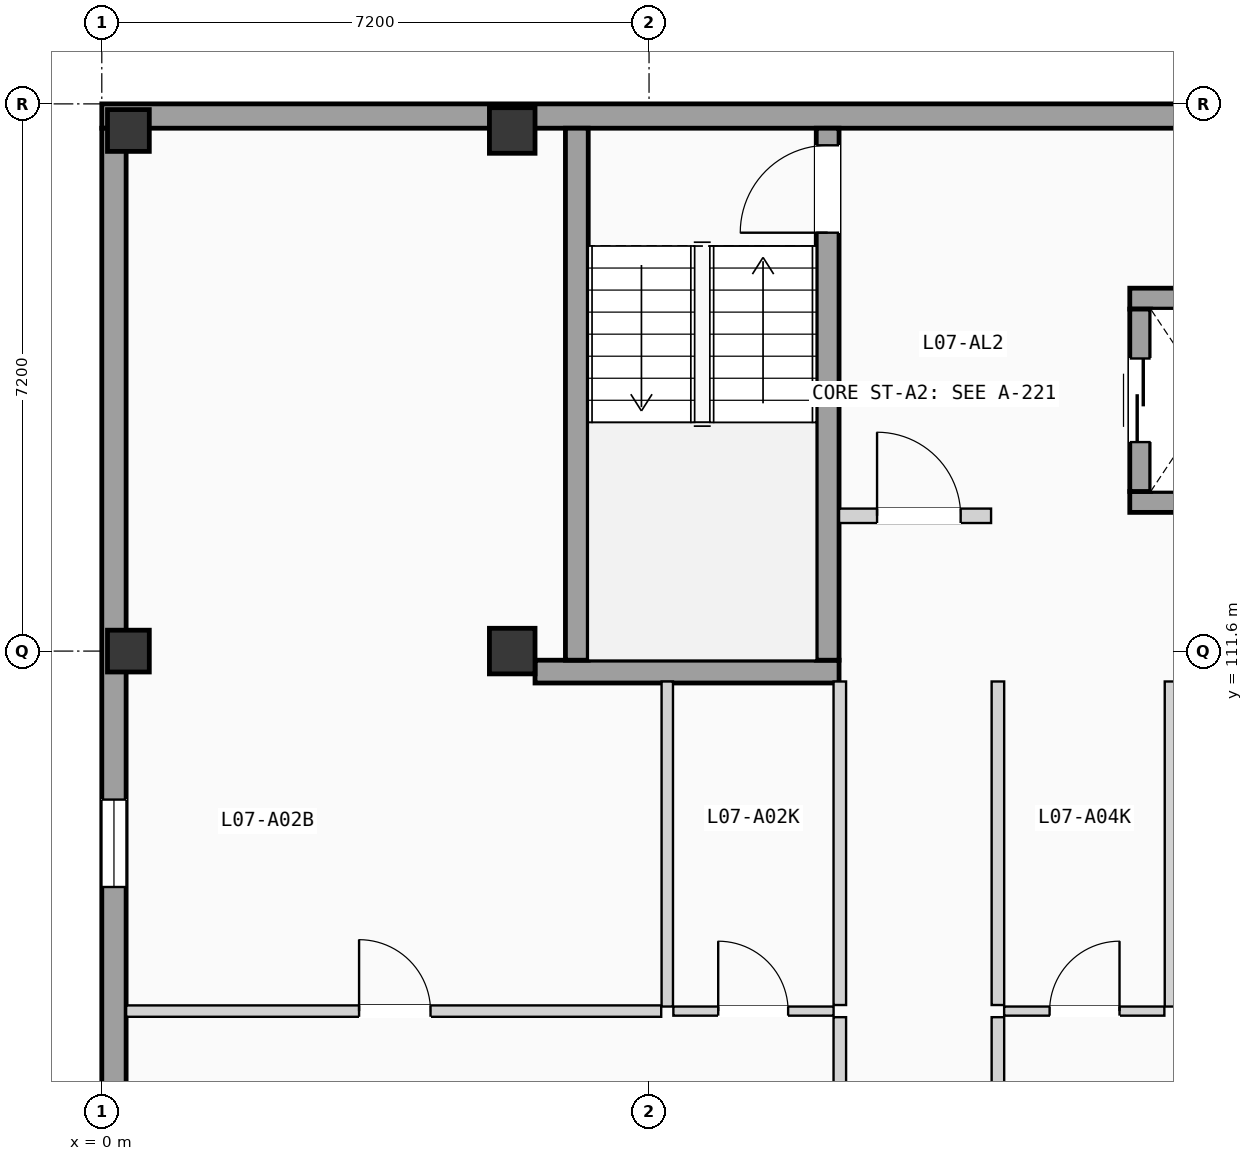
"""IFC4 building model, lengths in metres.
Left out: names, types, materials, properties, quantities, classifications, styles, units other than length and angle.
Written with IfcOpenShell. Run it as: python <this file> out.ifc"""

import sys

from ifc_helpers import new_model, si_unit, direction, frame, frame_2d, origin, origin_2d, place, context, subcontext, project, spatial, rectangle, extrude, element, fill, save


model = new_model("IFC4")
c1 = context("Model", 3, precision=1e-05, world=origin(), true_north=direction((0.0, 1.0)))
c2 = subcontext(c1, "Body", "Model", "MODEL_VIEW")
j1 = project(units=[si_unit("LENGTHUNIT", "METRE"), si_unit("PLANEANGLEUNIT", "RADIAN")], contexts=[c1])
p1 = place(None, origin())
s1 = spatial("IfcSite", under=j1, at=p1, CompositionType="ELEMENT")
p2 = place(p1, origin())
s2 = spatial("IfcBuilding", under=s1, at=p2, CompositionType="ELEMENT")
p3 = place(p2, frame((0.0, 0.0, 24.675)))
s3 = spatial("IfcBuildingStorey", under=s2, at=p3, CompositionType="ELEMENT", Elevation=24.675)
for number, where, z_axis, x_axis in (
    (1, (0.35, 111.6, 0.0), (0.0, 0.0, 1.0), (1.0, 0.0, 0.0)),
    (2, (0.35, 118.45, 0.0), (0.0, 0.0, 1.0), (1.0, 0.0, 0.0)),
):
    element("IfcColumn", number, at=place(p3, frame(where, z_axis=z_axis, x_axis=x_axis)), inside=s3, PredefinedType="COLUMN", context=c2, shape_type="SweptSolid", body=[
        extrude(rectangle(XDim=0.55, YDim=0.55, at=origin_2d()), origin(), (0.0, 0.0, 1.0), 3.15),
    ])
for number, where, z_axis, x_axis in (
    (3, (5.4, 111.6, 0.0), (0.0, 0.0, 1.0), (1.0, 0.0, 0.0)),
    (4, (5.4, 118.45, 0.0), (0.0, 0.0, 1.0), (1.0, 0.0, 0.0)),
):
    element("IfcColumn", number, at=place(p3, frame(where, z_axis=z_axis, x_axis=x_axis)), inside=s3, PredefinedType="COLUMN", context=c2, shape_type="SweptSolid", body=[
        extrude(rectangle(XDim=0.6, YDim=0.6, at=origin_2d()), origin(), (0.0, 0.0, 1.0), 3.15),
    ])
p4 = place(p3, frame((0.0, 118.64, 0.0), z_axis=(0.0, 0.0, 1.0), x_axis=(1.0, 0.0, 0.0)))
e5 = element("IfcWall", 5, at=p4, inside=s3, PredefinedType="SOLIDWALL", context=c2, shape_type="SweptSolid", body=[
    extrude(rectangle(XDim=21.6, YDim=0.32, at=frame_2d((10.8, 0.0))), origin(), (0.0, 0.0, 1.0), 2.9),
])
p5 = place(p3, frame((0.16, 68.72, 0.0), z_axis=(0.0, 0.0, 1.0), x_axis=(0.0, 1.0, 0.0)))
e6 = element("IfcWall", 6, at=p5, inside=s3, PredefinedType="SOLIDWALL", context=c2, shape_type="SweptSolid", body=[
    extrude(rectangle(XDim=49.76, YDim=0.32, at=frame_2d((24.88, 0.0))), origin(), (0.0, 0.0, 1.0), 2.9),
])
p6 = place(p5, frame((17.155, 0.0, 0.715)))
e7 = element("IfcOpeningElement", 7, at=p6, cuts=e6, PredefinedType="OPENING", context=c2, shape_type="SweptSolid", body=[
    extrude(rectangle(XDim=1.05, YDim=1.5, at=frame_2d((0.525, 0.75))), frame((0.0, 0.17, 0.0), z_axis=(0.0, -1.0, 0.0), x_axis=(1.0, 0.0, 0.0)), (0.0, 0.0, 1.0), 0.34),
])
p7 = place(p5, frame((10.02, 0.0, 0.565)))
e8 = element("IfcOpeningElement", 8, at=p7, cuts=e6, PredefinedType="OPENING", context=c2, shape_type="SweptSolid", body=[
    extrude(rectangle(XDim=1.05, YDim=1.65, at=frame_2d((0.525, 0.825))), frame((0.0, 0.17, 0.0), z_axis=(0.0, -1.0, 0.0), x_axis=(1.0, 0.0, 0.0)), (0.0, 0.0, 1.0), 0.34),
])
p8 = place(p5, frame((24.405, 0.0, 0.85)))
e9 = element("IfcOpeningElement", 9, at=p8, cuts=e6, PredefinedType="OPENING", context=c2, shape_type="SweptSolid", body=[
    extrude(rectangle(XDim=0.95, YDim=1.2, at=frame_2d((0.475, 0.6))), frame((0.0, 0.17, 0.0), z_axis=(0.0, -1.0, 0.0), x_axis=(1.0, 0.0, 0.0)), (0.0, 0.0, 1.0), 0.34),
])
p9 = place(p5, frame((33.584, 0.0, 0.9)))
e10 = element("IfcOpeningElement", 10, at=p9, cuts=e6, PredefinedType="OPENING", context=c2, shape_type="SweptSolid", body=[
    extrude(rectangle(XDim=1.15, YDim=1.2, at=frame_2d((0.575, 0.6))), frame((0.0, 0.17, 0.0), z_axis=(0.0, -1.0, 0.0), x_axis=(1.0, 0.0, 0.0)), (0.0, 0.0, 1.0), 0.34),
])
p10 = place(p5, frame((30.174, 0.0, 0.865)))
e11 = element("IfcOpeningElement", 11, at=p10, cuts=e6, PredefinedType="OPENING", context=c2, shape_type="SweptSolid", body=[
    extrude(rectangle(XDim=1.15, YDim=1.35, at=frame_2d((0.575, 0.675))), frame((0.0, 0.17, 0.0), z_axis=(0.0, -1.0, 0.0), x_axis=(1.0, 0.0, 0.0)), (0.0, 0.0, 1.0), 0.34),
])
p11 = place(p5, frame((39.776, 0.0, 0.715)))
e12 = element("IfcOpeningElement", 12, at=p11, cuts=e6, PredefinedType="OPENING", context=c2, shape_type="SweptSolid", body=[
    extrude(rectangle(XDim=1.15, YDim=1.5, at=frame_2d((0.575, 0.75))), frame((0.0, 0.17, 0.0), z_axis=(0.0, -1.0, 0.0), x_axis=(1.0, 0.0, 0.0)), (0.0, 0.0, 1.0), 0.34),
])
p12 = place(p3, frame((5.7, 111.33, 0.0), z_axis=(0.0, 0.0, 1.0), x_axis=(1.0, 0.0, 0.0)))
e13 = element("IfcWall", 13, at=p12, inside=s3, PredefinedType="SHEAR", context=c2, shape_type="SweptSolid", body=[
    extrude(rectangle(XDim=4.0, YDim=0.3, at=frame_2d((2.0, 0.0))), origin(), (0.0, 0.0, 1.0), 2.9),
])
p13 = place(p3, frame((6.25, 111.48, 0.0), z_axis=(0.0, 0.0, 1.0), x_axis=(0.0, 1.0, 0.0)))
e14 = element("IfcWall", 14, at=p13, inside=s3, PredefinedType="SHEAR", context=c2, shape_type="SweptSolid", body=[
    extrude(rectangle(XDim=7.0, YDim=0.3, at=frame_2d((3.5, 0.0))), origin(), (0.0, 0.0, 1.0), 2.9),
])
p14 = place(p3, frame((9.55, 111.48, 0.0), z_axis=(0.0, 0.0, 1.0), x_axis=(0.0, 1.0, 0.0)))
e15 = element("IfcWall", 15, at=p14, inside=s3, PredefinedType="SHEAR", context=c2, shape_type="SweptSolid", body=[
    extrude(rectangle(XDim=7.0, YDim=0.3, at=frame_2d((3.5, 0.0))), origin(), (0.0, 0.0, 1.0), 2.9),
])
p15 = place(p14, frame((5.625, 0.0, 0.0)))
e16 = element("IfcOpeningElement", 16, at=p15, cuts=e15, PredefinedType="OPENING", context=c2, shape_type="SweptSolid", body=[
    extrude(rectangle(XDim=1.15, YDim=2.12, at=frame_2d((0.575, 1.06))), frame((0.0, 0.16, 0.0), z_axis=(0.0, -1.0, 0.0), x_axis=(1.0, 0.0, 0.0)), (0.0, 0.0, 1.0), 0.32),
])
for number, where, z_axis, x_axis in (
    (17, (13.525, 113.562, 0.0), (0.0, 0.0, 1.0), (1.0, 0.0, 0.0)),
    (18, (13.525, 116.238, 0.0), (0.0, 0.0, 1.0), (1.0, 0.0, 0.0)),
):
    element("IfcWall", number, at=place(p3, frame(where, z_axis=z_axis, x_axis=x_axis)), inside=s3, PredefinedType="SHEAR", context=c2, shape_type="SweptSolid", body=[
        extrude(rectangle(XDim=2.15, YDim=0.275, at=frame_2d((1.075, 0.0))), origin(), (0.0, 0.0, 1.0), 2.9),
    ])
p16 = place(p3, frame((13.663, 113.7, 0.0), z_axis=(0.0, 0.0, 1.0), x_axis=(0.0, 1.0, 0.0)))
e19 = element("IfcWall", 19, at=p16, inside=s3, PredefinedType="SHEAR", context=c2, shape_type="SweptSolid", body=[
    extrude(rectangle(XDim=2.4, YDim=0.275, at=frame_2d((1.2, 0.0))), origin(), (0.0, 0.0, 1.0), 2.9),
])
p17 = place(p16, frame((0.65, 0.0, 0.0)))
e20 = element("IfcOpeningElement", 20, at=p17, cuts=e19, PredefinedType="OPENING", context=c2, shape_type="SweptSolid", body=[
    extrude(rectangle(XDim=1.1, YDim=2.15, at=frame_2d((0.55, 1.075))), frame((0.0, 0.147, 0.0), z_axis=(0.0, -1.0, 0.0), x_axis=(1.0, 0.0, 0.0)), (0.0, 0.0, 1.0), 0.295),
])
p18 = place(p3, frame((9.7, 113.38, 0.0), z_axis=(0.0, 0.0, 1.0), x_axis=(1.0, 0.0, 0.0)))
e21 = element("IfcWall", 21, at=p18, inside=s3, PredefinedType="PARTITIONING", context=c2, shape_type="SweptSolid", body=[
    extrude(rectangle(XDim=2.0, YDim=0.19, at=frame_2d((1.0, 0.0))), origin(), (0.0, 0.0, 1.0), 2.87),
])
p19 = place(p18, frame((0.5, 0.0, 0.0)))
e22 = element("IfcOpeningElement", 22, at=p19, cuts=e21, PredefinedType="OPENING", context=c2, shape_type="SweptSolid", body=[
    extrude(rectangle(XDim=1.1, YDim=2.12, at=frame_2d((0.55, 1.06))), frame((0.0, 0.105, 0.0), z_axis=(0.0, -1.0, 0.0), x_axis=(1.0, 0.0, 0.0)), (0.0, 0.0, 1.0), 0.21),
])
p20 = place(p3, frame((9.71, 101.627, 0.0), z_axis=(0.0, 0.0, 1.0), x_axis=(0.0, 1.0, 0.0)))
e23 = element("IfcWall", 23, at=p20, inside=s3, PredefinedType="PARTITIONING", context=c2, shape_type="SweptSolid", body=[
    extrude(rectangle(XDim=5.156, YDim=0.165, at=frame_2d((2.578, 0.0))), origin(), (0.0, 0.0, 1.0), 2.87),
])
p21 = place(p20, frame((2.088, 0.0, 0.0)))
e24 = element("IfcOpeningElement", 24, at=p21, cuts=e23, PredefinedType="OPENING", context=c2, shape_type="SweptSolid", body=[
    extrude(rectangle(XDim=0.98, YDim=2.08, at=frame_2d((0.49, 1.04))), frame((0.0, 0.093, 0.0), z_axis=(0.0, -1.0, 0.0), x_axis=(1.0, 0.0, 0.0)), (0.0, 0.0, 1.0), 0.185),
])
p22 = place(p3, frame((9.71, 106.943, 0.0), z_axis=(0.0, 0.0, 1.0), x_axis=(0.0, 1.0, 0.0)))
e25 = element("IfcWall", 25, at=p22, inside=s3, PredefinedType="PARTITIONING", context=c2, shape_type="SweptSolid", body=[
    extrude(rectangle(XDim=4.257, YDim=0.165, at=frame_2d((2.128, 0.0))), origin(), (0.0, 0.0, 1.0), 2.87),
])
p23 = place(p3, frame((11.79, 101.627, 0.0), z_axis=(0.0, 0.0, 1.0), x_axis=(0.0, 1.0, 0.0)))
e26 = element("IfcWall", 26, at=p23, inside=s3, PredefinedType="PARTITIONING", context=c2, shape_type="SweptSolid", body=[
    extrude(rectangle(XDim=5.156, YDim=0.165, at=frame_2d((2.578, 0.0))), origin(), (0.0, 0.0, 1.0), 2.87),
])
p24 = place(p23, frame((2.088, 0.0, 0.0)))
e27 = element("IfcOpeningElement", 27, at=p24, cuts=e26, PredefinedType="OPENING", context=c2, shape_type="SweptSolid", body=[
    extrude(rectangle(XDim=0.98, YDim=2.08, at=frame_2d((0.49, 1.04))), frame((0.0, 0.093, 0.0), z_axis=(0.0, -1.0, 0.0), x_axis=(1.0, 0.0, 0.0)), (0.0, 0.0, 1.0), 0.185),
])
p25 = place(p3, frame((11.79, 106.943, 0.0), z_axis=(0.0, 0.0, 1.0), x_axis=(0.0, 1.0, 0.0)))
e28 = element("IfcWall", 28, at=p25, inside=s3, PredefinedType="PARTITIONING", context=c2, shape_type="SweptSolid", body=[
    extrude(rectangle(XDim=4.257, YDim=0.165, at=frame_2d((2.128, 0.0))), origin(), (0.0, 0.0, 1.0), 2.87),
])
p26 = place(p3, frame((7.52, 106.863, 0.0), z_axis=(0.0, 0.0, 1.0), x_axis=(1.0, 0.0, 0.0)))
e29 = element("IfcWall", 29, at=p26, inside=s3, PredefinedType="PARTITIONING", context=c2, shape_type="SweptSolid", body=[
    extrude(rectangle(XDim=2.108, YDim=0.12, at=frame_2d((1.054, 0.0))), origin(), (0.0, 0.0, 1.0), 2.87),
])
p27 = place(p26, frame((0.59, 0.0, 0.0)))
e30 = element("IfcOpeningElement", 30, at=p27, cuts=e29, PredefinedType="OPENING", context=c2, shape_type="SweptSolid", body=[
    extrude(rectangle(XDim=0.92, YDim=2.02, at=frame_2d((0.46, 1.01))), frame((0.0, 0.07, 0.0), z_axis=(0.0, -1.0, 0.0), x_axis=(1.0, 0.0, 0.0)), (0.0, 0.0, 1.0), 0.14),
])
p28 = place(p3, frame((0.32, 106.863, 0.0), z_axis=(0.0, 0.0, 1.0), x_axis=(1.0, 0.0, 0.0)))
e31 = element("IfcWall", 31, at=p28, inside=s3, PredefinedType="PARTITIONING", context=c2, shape_type="SweptSolid", body=[
    extrude(rectangle(XDim=7.04, YDim=0.15, at=frame_2d((3.52, 0.0))), origin(), (0.0, 0.0, 1.0), 2.87),
])
p29 = place(p28, frame((3.065, 0.0, 0.0)))
e32 = element("IfcOpeningElement", 32, at=p29, cuts=e31, PredefinedType="OPENING", context=c2, shape_type="SweptSolid", body=[
    extrude(rectangle(XDim=0.94, YDim=2.06, at=frame_2d((0.47, 1.03))), frame((0.0, 0.085, 0.0), z_axis=(0.0, -1.0, 0.0), x_axis=(1.0, 0.0, 0.0)), (0.0, 0.0, 1.0), 0.17),
])
p30 = place(p3, frame((7.44, 106.923, 0.0), z_axis=(0.0, 0.0, 1.0), x_axis=(0.0, 1.0, 0.0)))
e33 = element("IfcWall", 33, at=p30, inside=s3, PredefinedType="PARTITIONING", context=c2, shape_type="SweptSolid", body=[
    extrude(rectangle(XDim=4.277, YDim=0.15, at=frame_2d((2.138, 0.0))), origin(), (0.0, 0.0, 1.0), 2.87),
])
p31 = place(p3, frame((11.872, 106.863, 0.0), z_axis=(0.0, 0.0, 1.0), x_axis=(1.0, 0.0, 0.0)))
e34 = element("IfcWall", 34, at=p31, inside=s3, PredefinedType="PARTITIONING", context=c2, shape_type="SweptSolid", body=[
    extrude(rectangle(XDim=2.108, YDim=0.12, at=frame_2d((1.054, 0.0))), origin(), (0.0, 0.0, 1.0), 2.87),
])
p32 = place(p31, frame((0.598, 0.0, 0.0)))
e35 = element("IfcOpeningElement", 35, at=p32, cuts=e34, PredefinedType="OPENING", context=c2, shape_type="SweptSolid", body=[
    extrude(rectangle(XDim=0.92, YDim=2.02, at=frame_2d((0.46, 1.01))), frame((0.0, 0.07, 0.0), z_axis=(0.0, -1.0, 0.0), x_axis=(1.0, 0.0, 0.0)), (0.0, 0.0, 1.0), 0.14),
])
p33 = place(p3, frame((14.06, 106.923, 0.0), z_axis=(0.0, 0.0, 1.0), x_axis=(0.0, 1.0, 0.0)))
e36 = element("IfcWall", 36, at=p33, inside=s3, PredefinedType="PARTITIONING", context=c2, shape_type="SweptSolid", body=[
    extrude(rectangle(XDim=4.277, YDim=0.15, at=frame_2d((2.138, 0.0))), origin(), (0.0, 0.0, 1.0), 2.87),
])
p34 = place(p11, origin())
e37 = element("IfcWindow", 37, at=p34, inside=s3, PartitioningType="SINGLE_PANEL", PredefinedType="WINDOW", context=c2, shape_type="SweptSolid", body=[
    extrude(rectangle(XDim=1.15, YDim=1.5, at=frame_2d((0.575, 0.75))), frame((0.0, 0.03, 0.0), z_axis=(0.0, -1.0, 0.0), x_axis=(1.0, 0.0, 0.0)), (0.0, 0.0, 1.0), 0.06),
])
fill(e12, e37)
p35 = place(p15, origin())
e38 = element("IfcDoor", 38, at=p35, inside=s3, OperationType="SINGLE_SWING_LEFT", PredefinedType="DOOR", context=c2, shape_type="SweptSolid", body=[
    extrude(rectangle(XDim=1.15, YDim=2.12, at=frame_2d((0.575, 1.06))), frame((0.0, 0.025, 0.0), z_axis=(0.0, -1.0, 0.0), x_axis=(1.0, 0.0, 0.0)), (0.0, 0.0, 1.0), 0.05),
])
fill(e16, e38)
p36 = place(p17, origin())
e39 = element("IfcDoor", 39, at=p36, inside=s3, OperationType="SLIDING_TO_LEFT", PredefinedType="DOOR", context=c2, shape_type="SweptSolid", body=[
    extrude(rectangle(XDim=1.1, YDim=2.15, at=frame_2d((0.55, 1.075))), frame((0.0, 0.025, 0.0), z_axis=(0.0, -1.0, 0.0), x_axis=(1.0, 0.0, 0.0)), (0.0, 0.0, 1.0), 0.05),
])
fill(e20, e39)
p37 = place(p19, origin())
e40 = element("IfcDoor", 40, at=p37, inside=s3, OperationType="SINGLE_SWING_LEFT", PredefinedType="DOOR", context=c2, shape_type="SweptSolid", body=[
    extrude(rectangle(XDim=1.1, YDim=2.12, at=frame_2d((0.55, 1.06))), frame((0.0, 0.025, 0.0), z_axis=(0.0, -1.0, 0.0), x_axis=(1.0, 0.0, 0.0)), (0.0, 0.0, 1.0), 0.05),
])
fill(e22, e40)
p38 = place(p27, origin())
e41 = element("IfcDoor", 41, at=p38, inside=s3, OperationType="SINGLE_SWING_LEFT", PredefinedType="DOOR", context=c2, shape_type="SweptSolid", body=[
    extrude(rectangle(XDim=0.92, YDim=2.02, at=frame_2d((0.46, 1.01))), frame((0.0, 0.025, 0.0), z_axis=(0.0, -1.0, 0.0), x_axis=(1.0, 0.0, 0.0)), (0.0, 0.0, 1.0), 0.05),
])
fill(e30, e41)
p39 = place(p29, origin())
e42 = element("IfcDoor", 42, at=p39, inside=s3, OperationType="SINGLE_SWING_LEFT", PredefinedType="DOOR", context=c2, shape_type="SweptSolid", body=[
    extrude(rectangle(XDim=0.94, YDim=2.06, at=frame_2d((0.47, 1.03))), frame((0.0, 0.025, 0.0), z_axis=(0.0, -1.0, 0.0), x_axis=(1.0, 0.0, 0.0)), (0.0, 0.0, 1.0), 0.05),
])
fill(e32, e42)
p40 = place(p32, origin())
e43 = element("IfcDoor", 43, at=p40, inside=s3, OperationType="SINGLE_SWING_RIGHT", PredefinedType="DOOR", context=c2, shape_type="SweptSolid", body=[
    extrude(rectangle(XDim=0.92, YDim=2.02, at=frame_2d((0.46, 1.01))), frame((0.0, 0.025, 0.0), z_axis=(0.0, -1.0, 0.0), x_axis=(1.0, 0.0, 0.0)), (0.0, 0.0, 1.0), 0.05),
])
fill(e35, e43)
save(model, sys.argv[1])
